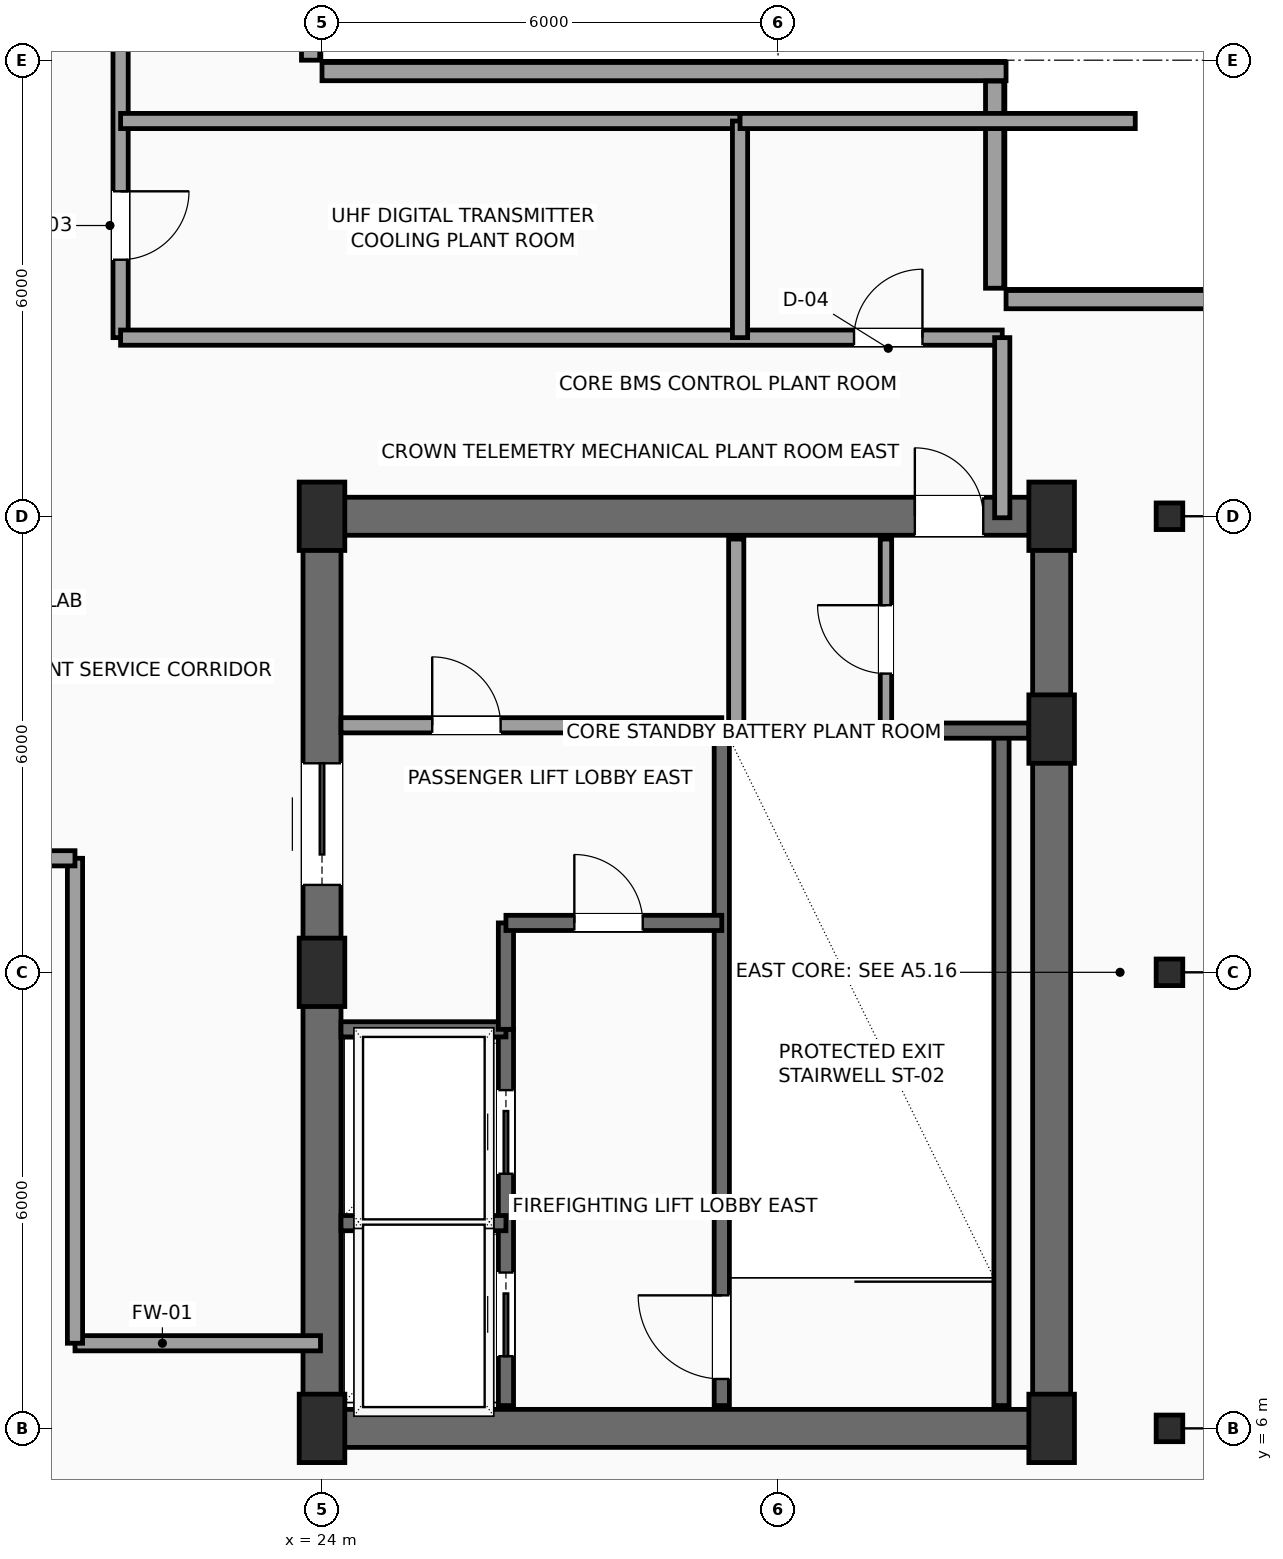
"""IFC4 building model, lengths in metres.
Left out: names, types, materials, properties, quantities, classifications, styles, units other than length and angle.
Written with IfcOpenShell. Run it as: python <this file> out.ifc"""

import sys

from ifc_helpers import new_model, si_unit, direction, frame, frame_2d, origin, origin_2d, place, context, subcontext, project, spatial, rectangle, hollow_rectangle, extrude, element, fill, save


model = new_model("IFC4")
c1 = context("Model", 3, precision=1e-05, world=origin(), true_north=direction((0.0, 1.0)))
c2 = subcontext(c1, "Body", "Model", "MODEL_VIEW")
j1 = project(units=[si_unit("LENGTHUNIT", "METRE"), si_unit("PLANEANGLEUNIT", "RADIAN")], contexts=[c1])
p1 = place(None, origin())
s1 = spatial("IfcSite", under=j1, at=p1, CompositionType="ELEMENT")
p2 = place(p1, origin())
s2 = spatial("IfcBuilding", under=s1, at=p2, CompositionType="ELEMENT")
p3 = place(p2, frame((0.0, 0.0, 305.7)))
s3 = spatial("IfcBuildingStorey", under=s2, at=p3, CompositionType="ELEMENT", Elevation=305.7)
for number, where, z_axis, x_axis in (
    (1, (24.0, 6.0, 0.0), (0.0, 0.0, 1.0), (1.0, 0.0, 0.0)),
    (2, (24.0, 12.0, 0.0), (0.0, 0.0, 1.0), (1.0, 0.0, 0.0)),
    (3, (24.0, 18.0, 0.0), (0.0, 0.0, 1.0), (1.0, 0.0, 0.0)),
    (4, (33.6, 6.0, 0.0), (0.0, 0.0, 1.0), (1.0, 0.0, 0.0)),
    (5, (33.6, 15.2, 0.0), (0.0, 0.0, 1.0), (1.0, 0.0, 0.0)),
    (6, (33.6, 18.0, 0.0), (0.0, 0.0, 1.0), (1.0, 0.0, 0.0)),
):
    element("IfcColumn", number, at=place(p3, frame(where, z_axis=z_axis, x_axis=x_axis)), inside=s3, PredefinedType="COLUMN", context=c2, shape_type="SweptSolid", body=[
        extrude(rectangle(XDim=0.6, YDim=0.9, at=origin_2d()), origin(), (0.0, 0.0, 1.0), 4.8),
    ])
for number, where, z_axis, x_axis in (
    (7, (35.15, 6.0, 0.0), (0.0, 0.0, 1.0), (1.0, 0.0, 0.0)),
    (8, (35.15, 12.0, 0.0), (0.0, 0.0, 1.0), (1.0, 0.0, 0.0)),
    (9, (35.15, 18.0, 0.0), (0.0, 0.0, 1.0), (1.0, 0.0, 0.0)),
):
    element("IfcColumn", number, at=place(p3, frame(where, z_axis=z_axis, x_axis=x_axis)), inside=s3, PredefinedType="COLUMN", context=c2, shape_type="SweptSolid", body=[
        extrude(hollow_rectangle(XDim=0.35, YDim=0.35, WallThickness=0.016, InnerFilletRadius=0.016, OuterFilletRadius=0.032, at=origin_2d()), origin(), (0.0, 0.0, 1.0), 4.8),
    ])
p4 = place(p3, frame((23.85, 26.725, 0.0), z_axis=(0.0, 0.0, 1.0), x_axis=(0.0, -1.0, 0.0)))
e10 = element("IfcWall", 10, at=p4, inside=s3, PredefinedType="SOLIDWALL", context=c2, shape_type="SweptSolid", body=[
    extrude(rectangle(XDim=2.725, YDim=0.24, at=frame_2d((1.363, 0.0))), origin(), (0.0, 0.0, 1.0), 4.55),
])
p5 = place(p3, frame((24.0, 23.85, 0.0), z_axis=(0.0, 0.0, 1.0), x_axis=(1.0, 0.0, 0.0)))
e11 = element("IfcWall", 11, at=p5, inside=s3, PredefinedType="SOLIDWALL", context=c2, shape_type="SweptSolid", body=[
    extrude(rectangle(XDim=9.0, YDim=0.24, at=frame_2d((4.5, 0.0))), origin(), (0.0, 0.0, 1.0), 4.55),
])
p6 = place(p3, frame((32.85, 23.725, 0.0), z_axis=(0.0, 0.0, 1.0), x_axis=(0.0, -1.0, 0.0)))
e12 = element("IfcWall", 12, at=p6, inside=s3, PredefinedType="SOLIDWALL", context=c2, shape_type="SweptSolid", body=[
    extrude(rectangle(XDim=2.725, YDim=0.24, at=frame_2d((1.363, 0.0))), origin(), (0.0, 0.0, 1.0), 4.55),
])
p7 = place(p3, frame((33.0, 20.85, 0.0), z_axis=(0.0, 0.0, 1.0), x_axis=(1.0, 0.0, 0.0)))
e13 = element("IfcWall", 13, at=p7, inside=s3, PredefinedType="SOLIDWALL", context=c2, shape_type="SweptSolid", body=[
    extrude(rectangle(XDim=3.0, YDim=0.24, at=frame_2d((1.5, 0.0))), origin(), (0.0, 0.0, 1.0), 4.55),
])
p8 = place(p3, frame((24.0, 6.0, 0.0), z_axis=(0.0, 0.0, 1.0), x_axis=(1.0, 0.0, 0.0)))
e14 = element("IfcWall", 14, at=p8, inside=s3, PredefinedType="SHEAR", context=c2, shape_type="SweptSolid", body=[
    extrude(rectangle(XDim=9.6, YDim=0.5, at=frame_2d((4.8, 0.0))), origin(), (0.0, 0.0, 1.0), 4.55),
])
p9 = place(p3, frame((24.0, 18.0, 0.0), z_axis=(0.0, 0.0, 1.0), x_axis=(1.0, 0.0, 0.0)))
e15 = element("IfcWall", 15, at=p9, inside=s3, PredefinedType="SHEAR", context=c2, shape_type="SweptSolid", body=[
    extrude(rectangle(XDim=9.6, YDim=0.5, at=frame_2d((4.8, 0.0))), origin(), (0.0, 0.0, 1.0), 4.55),
])
p10 = place(p9, frame((7.8, 0.0, 0.0)))
e16 = element("IfcOpeningElement", 16, at=p10, cuts=e15, PredefinedType="OPENING", context=c2, shape_type="SweptSolid", body=[
    extrude(rectangle(XDim=0.9, YDim=2.15, at=frame_2d((0.45, 1.075))), frame((0.0, 0.26, 0.0), z_axis=(0.0, -1.0, 0.0), x_axis=(1.0, 0.0, 0.0)), (0.0, 0.0, 1.0), 0.52),
])
p11 = place(p3, frame((24.0, 6.0, 0.0), z_axis=(0.0, 0.0, 1.0), x_axis=(0.0, 1.0, 0.0)))
e17 = element("IfcWall", 17, at=p11, inside=s3, PredefinedType="SHEAR", context=c2, shape_type="SweptSolid", body=[
    extrude(rectangle(XDim=12.0, YDim=0.5, at=frame_2d((6.0, 0.0))), origin(), (0.0, 0.0, 1.0), 4.55),
])
p12 = place(p11, frame((7.15, 0.0, 0.0)))
e18 = element("IfcOpeningElement", 18, at=p12, cuts=e17, PredefinedType="OPENING", context=c2, shape_type="SweptSolid", body=[
    extrude(rectangle(XDim=1.6, YDim=2.3, at=frame_2d((0.8, 1.15))), frame((0.0, 0.26, 0.0), z_axis=(0.0, -1.0, 0.0), x_axis=(1.0, 0.0, 0.0)), (0.0, 0.0, 1.0), 0.52),
])
p13 = place(p3, frame((33.6, 6.0, 0.0), z_axis=(0.0, 0.0, 1.0), x_axis=(0.0, 1.0, 0.0)))
e19 = element("IfcWall", 19, at=p13, inside=s3, PredefinedType="SHEAR", context=c2, shape_type="SweptSolid", body=[
    extrude(rectangle(XDim=12.0, YDim=0.5, at=frame_2d((6.0, 0.0))), origin(), (0.0, 0.0, 1.0), 4.55),
])
p14 = place(p3, frame((29.26, 6.3, 0.0), z_axis=(0.0, 0.0, 1.0), x_axis=(0.0, 1.0, 0.0)))
e20 = element("IfcWall", 20, at=p14, inside=s3, PredefinedType="SHEAR", context=c2, shape_type="SweptSolid", body=[
    extrude(rectangle(XDim=8.88, YDim=0.2, at=frame_2d((4.44, 0.0))), origin(), (0.0, 0.0, 1.0), 4.55),
])
p15 = place(p14, frame((0.35, 0.0, 0.0)))
e21 = element("IfcOpeningElement", 21, at=p15, cuts=e20, PredefinedType="OPENING", context=c2, shape_type="SweptSolid", body=[
    extrude(rectangle(XDim=1.1, YDim=2.2, at=frame_2d((0.55, 1.1))), frame((0.0, 0.11, 0.0), z_axis=(0.0, -1.0, 0.0), x_axis=(1.0, 0.0, 0.0)), (0.0, 0.0, 1.0), 0.22),
])
p16 = place(p3, frame((32.94, 6.3, 0.0), z_axis=(0.0, 0.0, 1.0), x_axis=(0.0, 1.0, 0.0)))
e22 = element("IfcWall", 22, at=p16, inside=s3, PredefinedType="SHEAR", context=c2, shape_type="SweptSolid", body=[
    extrude(rectangle(XDim=8.88, YDim=0.2, at=frame_2d((4.44, 0.0))), origin(), (0.0, 0.0, 1.0), 4.55),
])
p17 = place(p3, frame((29.26, 15.18, 0.0), z_axis=(0.0, 0.0, 1.0), x_axis=(1.0, 0.0, 0.0)))
e23 = element("IfcWall", 23, at=p17, inside=s3, PredefinedType="SHEAR", context=c2, shape_type="SweptSolid", body=[
    extrude(rectangle(XDim=4.04, YDim=0.2, at=frame_2d((2.02, 0.0))), origin(), (0.0, 0.0, 1.0), 4.55),
])
p18 = place(p3, frame((26.42, 6.3, 0.0), z_axis=(0.0, 0.0, 1.0), x_axis=(0.0, 1.0, 0.0)))
e24 = element("IfcWall", 24, at=p18, inside=s3, PredefinedType="SHEAR", context=c2, shape_type="SweptSolid", body=[
    extrude(rectangle(XDim=4.95, YDim=0.2, at=frame_2d((2.475, 0.0))), origin(), (0.0, 0.0, 1.0), 4.55),
])
p19 = place(p18, frame((0.65, 0.0, 0.0)))
e25 = element("IfcOpeningElement", 25, at=p19, cuts=e24, PredefinedType="OPENING", context=c2, shape_type="SweptSolid", body=[
    extrude(rectangle(XDim=1.1, YDim=2.2, at=frame_2d((0.55, 1.1))), frame((0.0, 0.11, 0.0), z_axis=(0.0, -1.0, 0.0), x_axis=(1.0, 0.0, 0.0)), (0.0, 0.0, 1.0), 0.22),
])
p20 = place(p18, frame((3.05, 0.0, 0.0)))
e26 = element("IfcOpeningElement", 26, at=p20, cuts=e24, PredefinedType="OPENING", context=c2, shape_type="SweptSolid", body=[
    extrude(rectangle(XDim=1.1, YDim=2.2, at=frame_2d((0.55, 1.1))), frame((0.0, 0.11, 0.0), z_axis=(0.0, -1.0, 0.0), x_axis=(1.0, 0.0, 0.0)), (0.0, 0.0, 1.0), 0.22),
])
for number, where, z_axis, x_axis in (
    (27, (24.25, 8.7, 0.0), (0.0, 0.0, 1.0), (1.0, 0.0, 0.0)),
    (28, (24.25, 11.25, 0.0), (0.0, 0.0, 1.0), (1.0, 0.0, 0.0)),
):
    element("IfcWall", number, at=place(p3, frame(where, z_axis=z_axis, x_axis=x_axis)), inside=s3, PredefinedType="SHEAR", context=c2, shape_type="SweptSolid", body=[
        extrude(rectangle(XDim=2.17, YDim=0.2, at=frame_2d((1.085, 0.0))), origin(), (0.0, 0.0, 1.0), 4.55),
    ])
p21 = place(p3, frame((26.42, 11.25, 0.0), z_axis=(0.0, 0.0, 1.0), x_axis=(0.0, 1.0, 0.0)))
e29 = element("IfcWall", 29, at=p21, inside=s3, PredefinedType="SHEAR", context=c2, shape_type="SweptSolid", body=[
    extrude(rectangle(XDim=1.4, YDim=0.2, at=frame_2d((0.7, 0.0))), origin(), (0.0, 0.0, 1.0), 4.55),
])
p22 = place(p3, frame((26.42, 12.65, 0.0), z_axis=(0.0, 0.0, 1.0), x_axis=(1.0, 0.0, 0.0)))
e30 = element("IfcWall", 30, at=p22, inside=s3, PredefinedType="SHEAR", context=c2, shape_type="SweptSolid", body=[
    extrude(rectangle(XDim=2.84, YDim=0.2, at=frame_2d((1.42, 0.0))), origin(), (0.0, 0.0, 1.0), 4.55),
])
p23 = place(p22, frame((0.9, 0.0, 0.0)))
e31 = element("IfcOpeningElement", 31, at=p23, cuts=e30, PredefinedType="OPENING", context=c2, shape_type="SweptSolid", body=[
    extrude(rectangle(XDim=0.9, YDim=2.15, at=frame_2d((0.45, 1.075))), frame((0.0, 0.11, 0.0), z_axis=(0.0, -1.0, 0.0), x_axis=(1.0, 0.0, 0.0)), (0.0, 0.0, 1.0), 0.22),
])
p24 = place(p3, frame((24.25, 15.25, 0.0), z_axis=(0.0, 0.0, 1.0), x_axis=(1.0, 0.0, 0.0)))
e32 = element("IfcWall", 32, at=p24, inside=s3, PredefinedType="SOLIDWALL", context=c2, shape_type="SweptSolid", body=[
    extrude(rectangle(XDim=5.01, YDim=0.2, at=frame_2d((2.505, 0.0))), origin(), (0.0, 0.0, 1.0), 4.55),
])
p25 = place(p24, frame((1.2, 0.0, 0.0)))
e33 = element("IfcOpeningElement", 33, at=p25, cuts=e32, PredefinedType="OPENING", context=c2, shape_type="SweptSolid", body=[
    extrude(rectangle(XDim=0.9, YDim=2.15, at=frame_2d((0.45, 1.075))), frame((0.0, 0.11, 0.0), z_axis=(0.0, -1.0, 0.0), x_axis=(1.0, 0.0, 0.0)), (0.0, 0.0, 1.0), 0.22),
])
p26 = place(p3, frame((29.45, 15.25, 0.0), z_axis=(0.0, 0.0, 1.0), x_axis=(0.0, 1.0, 0.0)))
e34 = element("IfcWall", 34, at=p26, inside=s3, PredefinedType="SOLIDWALL", context=c2, shape_type="SweptSolid", body=[
    extrude(rectangle(XDim=2.45, YDim=0.2, at=frame_2d((1.225, 0.0))), origin(), (0.0, 0.0, 1.0), 4.55),
])
p27 = place(p3, frame((31.42, 15.28, 0.0), z_axis=(0.0, 0.0, 1.0), x_axis=(0.0, 1.0, 0.0)))
e35 = element("IfcWall", 35, at=p27, inside=s3, PredefinedType="PARTITIONING", context=c2, shape_type="SweptSolid", body=[
    extrude(rectangle(XDim=2.42, YDim=0.15, at=frame_2d((1.21, 0.0))), origin(), (0.0, 0.0, 1.0), 4.55),
])
p28 = place(p27, frame((0.65, 0.0, 0.0)))
e36 = element("IfcOpeningElement", 36, at=p28, cuts=e35, PredefinedType="OPENING", context=c2, shape_type="SweptSolid", body=[
    extrude(rectangle(XDim=0.9, YDim=2.15, at=frame_2d((0.45, 1.075))), frame((0.0, 0.085, 0.0), z_axis=(0.0, -1.0, 0.0), x_axis=(1.0, 0.0, 0.0)), (0.0, 0.0, 1.0), 0.17),
])
p29 = place(p3, frame((23.98, 7.12, 0.0), z_axis=(0.0, 0.0, 1.0), x_axis=(-1.0, 0.0, 0.0)))
e37 = element("IfcWall", 37, at=p29, inside=s3, PredefinedType="SOLIDWALL", context=c2, shape_type="SweptSolid", body=[
    extrude(rectangle(XDim=3.23, YDim=0.2, at=frame_2d((1.615, 0.0))), origin(), (0.0, 0.0, 1.0), 4.55),
])
p30 = place(p3, frame((20.75, 7.12, 0.0), z_axis=(0.0, 0.0, 1.0), x_axis=(0.0, 1.0, 0.0)))
e38 = element("IfcWall", 38, at=p30, inside=s3, PredefinedType="SOLIDWALL", context=c2, shape_type="SweptSolid", body=[
    extrude(rectangle(XDim=6.38, YDim=0.2, at=frame_2d((3.19, 0.0))), origin(), (0.0, 0.0, 1.0), 4.55),
])
p31 = place(p3, frame((20.75, 13.5, 0.0), z_axis=(0.0, 0.0, 1.0), x_axis=(-1.0, 0.0, 0.0)))
e39 = element("IfcWall", 39, at=p31, inside=s3, PredefinedType="SOLIDWALL", context=c2, shape_type="SweptSolid", body=[
    extrude(rectangle(XDim=13.55, YDim=0.2, at=frame_2d((6.775, 0.0))), origin(), (0.0, 0.0, 1.0), 4.55),
])
p32 = place(p31, frame((9.275, 0.0, 0.0)))
e40 = element("IfcOpeningElement", 40, at=p32, cuts=e39, PredefinedType="OPENING", context=c2, shape_type="SweptSolid", body=[
    extrude(rectangle(XDim=0.9, YDim=2.15, at=frame_2d((0.45, 1.075))), frame((0.0, 0.11, 0.0), z_axis=(0.0, -1.0, 0.0), x_axis=(1.0, 0.0, 0.0)), (0.0, 0.0, 1.0), 0.22),
])
p33 = place(p3, frame((21.35, 27.58, 0.0), z_axis=(0.0, 0.0, 1.0), x_axis=(0.0, -1.0, 0.0)))
e41 = element("IfcWall", 41, at=p33, inside=s3, PredefinedType="SOLIDWALL", context=c2, shape_type="SweptSolid", body=[
    extrude(rectangle(XDim=7.23, YDim=0.2, at=frame_2d((3.615, 0.0))), origin(), (0.0, 0.0, 1.0), 4.55),
])
p34 = place(p33, frame((5.305, 0.0, 0.0)))
e42 = element("IfcOpeningElement", 42, at=p34, cuts=e41, PredefinedType="OPENING", context=c2, shape_type="SweptSolid", body=[
    extrude(rectangle(XDim=0.9, YDim=2.15, at=frame_2d((0.45, 1.075))), frame((0.0, 0.11, 0.0), z_axis=(0.0, -1.0, 0.0), x_axis=(1.0, 0.0, 0.0)), (0.0, 0.0, 1.0), 0.22),
])
p35 = place(p3, frame((21.35, 20.35, 0.0), z_axis=(0.0, 0.0, 1.0), x_axis=(1.0, 0.0, 0.0)))
e43 = element("IfcWall", 43, at=p35, inside=s3, PredefinedType="SOLIDWALL", context=c2, shape_type="SweptSolid", body=[
    extrude(rectangle(XDim=11.6, YDim=0.2, at=frame_2d((5.8, 0.0))), origin(), (0.0, 0.0, 1.0), 4.55),
])
p36 = place(p35, frame((9.65, 0.0, 0.0)))
e44 = element("IfcOpeningElement", 44, at=p36, cuts=e43, PredefinedType="OPENING", context=c2, shape_type="SweptSolid", body=[
    extrude(rectangle(XDim=0.9, YDim=2.15, at=frame_2d((0.45, 1.075))), frame((0.0, 0.11, 0.0), z_axis=(0.0, -1.0, 0.0), x_axis=(1.0, 0.0, 0.0)), (0.0, 0.0, 1.0), 0.22),
])
p37 = place(p3, frame((32.95, 20.35, 0.0), z_axis=(0.0, 0.0, 1.0), x_axis=(0.0, -1.0, 0.0)))
e45 = element("IfcWall", 45, at=p37, inside=s3, PredefinedType="SOLIDWALL", context=c2, shape_type="SweptSolid", body=[
    extrude(rectangle(XDim=2.37, YDim=0.2, at=frame_2d((1.185, 0.0))), origin(), (0.0, 0.0, 1.0), 4.55),
])
p38 = place(p3, frame((21.35, 23.2, 0.0), z_axis=(0.0, 0.0, 1.0), x_axis=(1.0, 0.0, 0.0)))
e46 = element("IfcWall", 46, at=p38, inside=s3, PredefinedType="SOLIDWALL", context=c2, shape_type="SweptSolid", body=[
    extrude(rectangle(XDim=8.15, YDim=0.2, at=frame_2d((4.075, 0.0))), origin(), (0.0, 0.0, 1.0), 4.55),
])
p39 = place(p3, frame((29.5, 20.35, 0.0), z_axis=(0.0, 0.0, 1.0), x_axis=(0.0, 1.0, 0.0)))
e47 = element("IfcWall", 47, at=p39, inside=s3, PredefinedType="SOLIDWALL", context=c2, shape_type="SweptSolid", body=[
    extrude(rectangle(XDim=2.85, YDim=0.2, at=frame_2d((1.425, 0.0))), origin(), (0.0, 0.0, 1.0), 4.55),
])
p40 = place(p3, frame((29.5, 23.2, 0.0), z_axis=(0.0, 0.0, 1.0), x_axis=(1.0, 0.0, 0.0)))
e48 = element("IfcWall", 48, at=p40, inside=s3, PredefinedType="SOLIDWALL", context=c2, shape_type="SweptSolid", body=[
    extrude(rectangle(XDim=5.2, YDim=0.2, at=frame_2d((2.6, 0.0))), origin(), (0.0, 0.0, 1.0), 4.55),
])
p41 = place(p10, origin())
e49 = element("IfcDoor", 49, at=p41, inside=s3, OperationType="SINGLE_SWING_LEFT", PredefinedType="DOOR", context=c2, shape_type="SweptSolid", body=[
    extrude(rectangle(XDim=0.9, YDim=2.15, at=frame_2d((0.45, 1.075))), frame((0.0, 0.025, 0.0), z_axis=(0.0, -1.0, 0.0), x_axis=(1.0, 0.0, 0.0)), (0.0, 0.0, 1.0), 0.05),
])
fill(e16, e49)
p42 = place(p12, origin())
e50 = element("IfcDoor", 50, at=p42, inside=s3, OperationType="DOUBLE_DOOR_SLIDING", PredefinedType="DOOR", context=c2, shape_type="SweptSolid", body=[
    extrude(rectangle(XDim=1.6, YDim=2.3, at=frame_2d((0.8, 1.15))), frame((0.0, 0.025, 0.0), z_axis=(0.0, -1.0, 0.0), x_axis=(1.0, 0.0, 0.0)), (0.0, 0.0, 1.0), 0.05),
])
fill(e18, e50)
p43 = place(p15, origin())
e51 = element("IfcDoor", 51, at=p43, inside=s3, OperationType="SINGLE_SWING_RIGHT", PredefinedType="DOOR", context=c2, shape_type="SweptSolid", body=[
    extrude(rectangle(XDim=1.1, YDim=2.2, at=frame_2d((0.55, 1.1))), frame((0.0, 0.025, 0.0), z_axis=(0.0, -1.0, 0.0), x_axis=(1.0, 0.0, 0.0)), (0.0, 0.0, 1.0), 0.05),
])
fill(e21, e51)
p44 = place(p19, origin())
e52 = element("IfcDoor", 52, at=p44, inside=s3, OperationType="SLIDING_TO_LEFT", PredefinedType="DOOR", context=c2, shape_type="SweptSolid", body=[
    extrude(rectangle(XDim=1.1, YDim=2.2, at=frame_2d((0.55, 1.1))), frame((0.0, 0.025, 0.0), z_axis=(0.0, -1.0, 0.0), x_axis=(1.0, 0.0, 0.0)), (0.0, 0.0, 1.0), 0.05),
])
fill(e25, e52)
p45 = place(p20, origin())
e53 = element("IfcDoor", 53, at=p45, inside=s3, OperationType="SLIDING_TO_LEFT", PredefinedType="DOOR", context=c2, shape_type="SweptSolid", body=[
    extrude(rectangle(XDim=1.1, YDim=2.2, at=frame_2d((0.55, 1.1))), frame((0.0, 0.025, 0.0), z_axis=(0.0, -1.0, 0.0), x_axis=(1.0, 0.0, 0.0)), (0.0, 0.0, 1.0), 0.05),
])
fill(e26, e53)
p46 = place(p23, origin())
e54 = element("IfcDoor", 54, at=p46, inside=s3, OperationType="SINGLE_SWING_LEFT", PredefinedType="DOOR", context=c2, shape_type="SweptSolid", body=[
    extrude(rectangle(XDim=0.9, YDim=2.15, at=frame_2d((0.45, 1.075))), frame((0.0, 0.025, 0.0), z_axis=(0.0, -1.0, 0.0), x_axis=(1.0, 0.0, 0.0)), (0.0, 0.0, 1.0), 0.05),
])
fill(e31, e54)
p47 = place(p25, origin())
e55 = element("IfcDoor", 55, at=p47, inside=s3, OperationType="SINGLE_SWING_LEFT", PredefinedType="DOOR", context=c2, shape_type="SweptSolid", body=[
    extrude(rectangle(XDim=0.9, YDim=2.15, at=frame_2d((0.45, 1.075))), frame((0.0, 0.025, 0.0), z_axis=(0.0, -1.0, 0.0), x_axis=(1.0, 0.0, 0.0)), (0.0, 0.0, 1.0), 0.05),
])
fill(e33, e55)
p48 = place(p28, origin())
e56 = element("IfcDoor", 56, at=p48, inside=s3, OperationType="SINGLE_SWING_RIGHT", PredefinedType="DOOR", context=c2, shape_type="SweptSolid", body=[
    extrude(rectangle(XDim=0.9, YDim=2.15, at=frame_2d((0.45, 1.075))), frame((0.0, 0.025, 0.0), z_axis=(0.0, -1.0, 0.0), x_axis=(1.0, 0.0, 0.0)), (0.0, 0.0, 1.0), 0.05),
])
fill(e36, e56)
p49 = place(p34, origin())
e57 = element("IfcDoor", 57, at=p49, inside=s3, OperationType="SINGLE_SWING_LEFT", PredefinedType="DOOR", context=c2, shape_type="SweptSolid", body=[
    extrude(rectangle(XDim=0.9, YDim=2.15, at=frame_2d((0.45, 1.075))), frame((0.0, 0.025, 0.0), z_axis=(0.0, -1.0, 0.0), x_axis=(1.0, 0.0, 0.0)), (0.0, 0.0, 1.0), 0.05),
])
fill(e42, e57)
p50 = place(p36, origin())
e58 = element("IfcDoor", 58, at=p50, inside=s3, OperationType="SINGLE_SWING_RIGHT", PredefinedType="DOOR", context=c2, shape_type="SweptSolid", body=[
    extrude(rectangle(XDim=0.9, YDim=2.15, at=frame_2d((0.45, 1.075))), frame((0.0, 0.025, 0.0), z_axis=(0.0, -1.0, 0.0), x_axis=(1.0, 0.0, 0.0)), (0.0, 0.0, 1.0), 0.05),
])
fill(e44, e58)
save(model, sys.argv[1])
